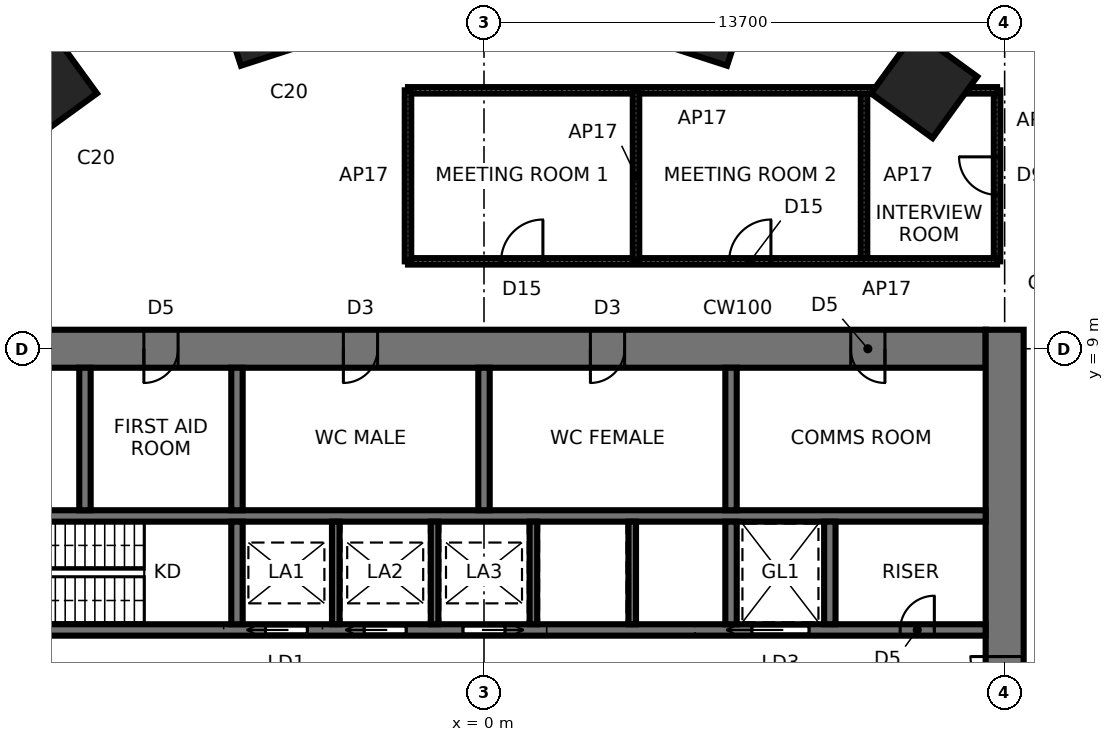
"""IFC4 building model, lengths in metres.
Left out: names, types, materials, properties, quantities, classifications, styles, units other than length and angle.
Written with IfcOpenShell. Run it as: python <this file> out.ifc"""

import sys

from ifc_helpers import new_model, si_unit, direction, frame, frame_2d, origin, origin_2d, place, context, subcontext, project, spatial, rectangle, extrude, element, fill, save


model = new_model("IFC4")
c1 = context("Model", 3, precision=1e-05, world=origin(), true_north=direction((0.0, 1.0)))
c2 = subcontext(c1, "Body", "Model", "MODEL_VIEW")
j1 = project(units=[si_unit("LENGTHUNIT", "METRE"), si_unit("PLANEANGLEUNIT", "RADIAN")], contexts=[c1])
p1 = place(None, origin())
s1 = spatial("IfcSite", under=j1, at=p1, CompositionType="ELEMENT")
p2 = place(p1, origin())
s2 = spatial("IfcBuilding", under=s1, at=p2, CompositionType="ELEMENT")
p3 = place(p2, frame((0.0, 0.0, 57.4)))
s3 = spatial("IfcBuildingStorey", under=s2, at=p3, CompositionType="ELEMENT", Elevation=57.4)
for number, where, z_axis, x_axis in (
    (1, (11.581, 15.94, 0.0), (0.0, 0.0, 1.0), (0.588, 0.809, 0.0)),
    (2, (5.754, 17.708, 0.0), (0.0, 0.0, 1.0), (0.309, 0.951, 0.0)),
    (3, (-5.754, 17.708, 0.0), (0.0, 0.0, 1.0), (-0.309, 0.951, 0.0)),
    (4, (-11.581, 15.94, 0.0), (0.0, 0.0, 1.0), (-0.588, 0.809, 0.0)),
):
    element("IfcColumn", number, at=place(p3, frame(where, z_axis=z_axis, x_axis=x_axis)), inside=s3, PredefinedType="COLUMN", context=c2, shape_type="SweptSolid", body=[
        extrude(rectangle(XDim=2.0, YDim=2.0, at=origin_2d()), origin(), (0.0, 0.0, 1.0), 4.2),
    ])
p4 = place(p3, frame((13.2, 9.0, 0.0), z_axis=(0.0, 0.0, 1.0), x_axis=(-1.0, 0.0, 0.0)))
e5 = element("IfcWall", 5, at=p4, inside=s3, PredefinedType="SHEAR", context=c2, shape_type="SweptSolid", body=[
    extrude(rectangle(XDim=26.4, YDim=1.0, at=frame_2d((13.2, 0.0))), origin(), (0.0, 0.0, 1.0), 4.2),
])
p5 = place(p4, frame((2.65, 0.0, 0.0)))
e6 = element("IfcOpeningElement", 6, at=p5, cuts=e5, PredefinedType="OPENING", context=c2, shape_type="SweptSolid", body=[
    extrude(rectangle(XDim=0.9, YDim=2.1, at=frame_2d((0.45, 1.05))), frame((0.0, 0.51, 0.0), z_axis=(0.0, -1.0, 0.0), x_axis=(1.0, 0.0, 0.0)), (0.0, 0.0, 1.0), 1.02),
])
p6 = place(p4, frame((9.5, 0.0, 0.0)))
e7 = element("IfcOpeningElement", 7, at=p6, cuts=e5, PredefinedType="OPENING", context=c2, shape_type="SweptSolid", body=[
    extrude(rectangle(XDim=0.9, YDim=2.1, at=frame_2d((0.45, 1.05))), frame((0.0, 0.51, 0.0), z_axis=(0.0, -1.0, 0.0), x_axis=(1.0, 0.0, 0.0)), (0.0, 0.0, 1.0), 1.02),
])
p7 = place(p4, frame((16.0, 0.0, 0.0)))
e8 = element("IfcOpeningElement", 8, at=p7, cuts=e5, PredefinedType="OPENING", context=c2, shape_type="SweptSolid", body=[
    extrude(rectangle(XDim=0.9, YDim=2.1, at=frame_2d((0.45, 1.05))), frame((0.0, 0.51, 0.0), z_axis=(0.0, -1.0, 0.0), x_axis=(1.0, 0.0, 0.0)), (0.0, 0.0, 1.0), 1.02),
])
p8 = place(p4, frame((21.25, 0.0, 0.0)))
e9 = element("IfcOpeningElement", 9, at=p8, cuts=e5, PredefinedType="OPENING", context=c2, shape_type="SweptSolid", body=[
    extrude(rectangle(XDim=0.9, YDim=2.1, at=frame_2d((0.45, 1.05))), frame((0.0, 0.51, 0.0), z_axis=(0.0, -1.0, 0.0), x_axis=(1.0, 0.0, 0.0)), (0.0, 0.0, 1.0), 1.02),
])
p9 = place(p4, frame((24.8, 0.0, 0.0)))
e10 = element("IfcOpeningElement", 10, at=p9, cuts=e5, PredefinedType="OPENING", context=c2, shape_type="SweptSolid", body=[
    extrude(rectangle(XDim=1.0, YDim=2.1, at=frame_2d((0.5, 1.05))), frame((0.0, 0.51, 0.0), z_axis=(0.0, -1.0, 0.0), x_axis=(1.0, 0.0, 0.0)), (0.0, 0.0, 1.0), 1.02),
])
p10 = place(p3, frame((13.7, -9.5, 0.0), z_axis=(0.0, 0.0, 1.0), x_axis=(0.0, 1.0, 0.0)))
e11 = element("IfcWall", 11, at=p10, inside=s3, PredefinedType="SHEAR", context=c2, shape_type="SweptSolid", body=[
    extrude(rectangle(XDim=19.0, YDim=1.0, at=frame_2d((9.5, 0.0))), origin(), (0.0, 0.0, 1.0), 4.2),
])
p11 = place(p10, frame((8.6, 0.0, 0.0)))
e12 = element("IfcOpeningElement", 12, at=p11, cuts=e11, PredefinedType="OPENING", context=c2, shape_type="SweptSolid", body=[
    extrude(rectangle(XDim=1.8, YDim=2.4, at=frame_2d((0.9, 1.2))), frame((0.0, 0.51, 0.0), z_axis=(0.0, -1.0, 0.0), x_axis=(1.0, 0.0, 0.0)), (0.0, 0.0, 1.0), 1.02),
])
p12 = place(p3, frame((-13.2, 1.6, 0.0), z_axis=(0.0, 0.0, 1.0), x_axis=(1.0, 0.0, 0.0)))
e13 = element("IfcWall", 13, at=p12, inside=s3, PredefinedType="SHEAR", context=c2, shape_type="SweptSolid", body=[
    extrude(rectangle(XDim=26.4, YDim=0.3, at=frame_2d((13.2, 0.0))), origin(), (0.0, 0.0, 1.0), 4.2),
])
p13 = place(p12, frame((0.25, 0.0, 0.0)))
e14 = element("IfcOpeningElement", 14, at=p13, cuts=e13, PredefinedType="OPENING", context=c2, shape_type="SweptSolid", body=[
    extrude(rectangle(XDim=1.0, YDim=2.1, at=frame_2d((0.5, 1.05))), frame((0.0, 0.16, 0.0), z_axis=(0.0, -1.0, 0.0), x_axis=(1.0, 0.0, 0.0)), (0.0, 0.0, 1.0), 0.32),
])
p14 = place(p12, frame((20.25, 0.0, 0.0)))
e15 = element("IfcOpeningElement", 15, at=p14, cuts=e13, PredefinedType="OPENING", context=c2, shape_type="SweptSolid", body=[
    extrude(rectangle(XDim=1.5, YDim=2.4, at=frame_2d((0.75, 1.2))), frame((0.0, 0.16, 0.0), z_axis=(0.0, -1.0, 0.0), x_axis=(1.0, 0.0, 0.0)), (0.0, 0.0, 1.0), 0.32),
])
p15 = place(p12, frame((7.45, 0.0, 0.0)))
e16 = element("IfcOpeningElement", 16, at=p15, cuts=e13, PredefinedType="OPENING", context=c2, shape_type="SweptSolid", body=[
    extrude(rectangle(XDim=1.1, YDim=2.3, at=frame_2d((0.55, 1.15))), frame((0.0, 0.16, 0.0), z_axis=(0.0, -1.0, 0.0), x_axis=(1.0, 0.0, 0.0)), (0.0, 0.0, 1.0), 0.32),
])
p16 = place(p12, frame((10.05, 0.0, 0.0)))
e17 = element("IfcOpeningElement", 17, at=p16, cuts=e13, PredefinedType="OPENING", context=c2, shape_type="SweptSolid", body=[
    extrude(rectangle(XDim=1.1, YDim=2.3, at=frame_2d((0.55, 1.15))), frame((0.0, 0.16, 0.0), z_axis=(0.0, -1.0, 0.0), x_axis=(1.0, 0.0, 0.0)), (0.0, 0.0, 1.0), 0.32),
])
p17 = place(p12, frame((12.65, 0.0, 0.0)))
e18 = element("IfcOpeningElement", 18, at=p17, cuts=e13, PredefinedType="OPENING", context=c2, shape_type="SweptSolid", body=[
    extrude(rectangle(XDim=1.1, YDim=2.3, at=frame_2d((0.55, 1.15))), frame((0.0, 0.16, 0.0), z_axis=(0.0, -1.0, 0.0), x_axis=(1.0, 0.0, 0.0)), (0.0, 0.0, 1.0), 0.32),
])
p18 = place(p12, frame((24.15, 0.0, 0.0)))
e19 = element("IfcOpeningElement", 19, at=p18, cuts=e13, PredefinedType="OPENING", context=c2, shape_type="SweptSolid", body=[
    extrude(rectangle(XDim=0.9, YDim=2.1, at=frame_2d((0.45, 1.05))), frame((0.0, 0.16, 0.0), z_axis=(0.0, -1.0, 0.0), x_axis=(1.0, 0.0, 0.0)), (0.0, 0.0, 1.0), 0.32),
])
p19 = place(p3, frame((-13.2, 4.6, 0.0), z_axis=(0.0, 0.0, 1.0), x_axis=(1.0, 0.0, 0.0)))
e20 = element("IfcWall", 20, at=p19, inside=s3, PredefinedType="SHEAR", context=c2, shape_type="SweptSolid", body=[
    extrude(rectangle(XDim=26.4, YDim=0.3, at=frame_2d((13.2, 0.0))), origin(), (0.0, 0.0, 1.0), 4.2),
])
p20 = place(p3, frame((-6.5, 1.75, 0.0), z_axis=(0.0, 0.0, 1.0), x_axis=(0.0, 1.0, 0.0)))
e21 = element("IfcWall", 21, at=p20, inside=s3, PredefinedType="SHEAR", context=c2, shape_type="SweptSolid", body=[
    extrude(rectangle(XDim=2.7, YDim=0.3, at=frame_2d((1.35, 0.0))), origin(), (0.0, 0.0, 1.0), 4.2),
])
p21 = place(p3, frame((-6.5, 4.75, 0.0), z_axis=(0.0, 0.0, 1.0), x_axis=(0.0, 1.0, 0.0)))
e22 = element("IfcWall", 22, at=p21, inside=s3, PredefinedType="SHEAR", context=c2, shape_type="SweptSolid", body=[
    extrude(rectangle(XDim=3.75, YDim=0.3, at=frame_2d((1.875, 0.0))), origin(), (0.0, 0.0, 1.0), 4.2),
])
p22 = place(p3, frame((6.5, 1.75, 0.0), z_axis=(0.0, 0.0, 1.0), x_axis=(0.0, 1.0, 0.0)))
e23 = element("IfcWall", 23, at=p22, inside=s3, PredefinedType="SHEAR", context=c2, shape_type="SweptSolid", body=[
    extrude(rectangle(XDim=2.7, YDim=0.3, at=frame_2d((1.35, 0.0))), origin(), (0.0, 0.0, 1.0), 4.2),
])
p23 = place(p3, frame((6.5, 4.75, 0.0), z_axis=(0.0, 0.0, 1.0), x_axis=(0.0, 1.0, 0.0)))
e24 = element("IfcWall", 24, at=p23, inside=s3, PredefinedType="SHEAR", context=c2, shape_type="SweptSolid", body=[
    extrude(rectangle(XDim=3.75, YDim=0.3, at=frame_2d((1.875, 0.0))), origin(), (0.0, 0.0, 1.0), 4.2),
])
for number, where, z_axis, x_axis in (
    (25, (-3.9, 1.75, 0.0), (0.0, 0.0, 1.0), (0.0, 1.0, 0.0)),
    (26, (-1.3, 1.75, 0.0), (0.0, 0.0, 1.0), (0.0, 1.0, 0.0)),
    (27, (1.3, 1.75, 0.0), (0.0, 0.0, 1.0), (0.0, 1.0, 0.0)),
    (28, (3.9, 1.75, 0.0), (0.0, 0.0, 1.0), (0.0, 1.0, 0.0)),
):
    element("IfcWall", number, at=place(p3, frame(where, z_axis=z_axis, x_axis=x_axis)), inside=s3, PredefinedType="SHEAR", context=c2, shape_type="SweptSolid", body=[
        extrude(rectangle(XDim=2.7, YDim=0.2, at=frame_2d((1.35, 0.0))), origin(), (0.0, 0.0, 1.0), 4.2),
    ])
for number, where, z_axis, x_axis in (
    (29, (0.0, 4.75, 0.0), (0.0, 0.0, 1.0), (0.0, 1.0, 0.0)),
    (30, (-10.5, 4.75, 0.0), (0.0, 0.0, 1.0), (0.0, 1.0, 0.0)),
):
    element("IfcWall", number, at=place(p3, frame(where, z_axis=z_axis, x_axis=x_axis)), inside=s3, PredefinedType="SHEAR", context=c2, shape_type="SweptSolid", body=[
        extrude(rectangle(XDim=3.75, YDim=0.3, at=frame_2d((1.875, 0.0))), origin(), (0.0, 0.0, 1.0), 4.2),
    ])
p24 = place(p3, frame((9.1, 1.75, 0.0), z_axis=(0.0, 0.0, 1.0), x_axis=(0.0, 1.0, 0.0)))
e31 = element("IfcWall", 31, at=p24, inside=s3, PredefinedType="SHEAR", context=c2, shape_type="SweptSolid", body=[
    extrude(rectangle(XDim=2.7, YDim=0.3, at=frame_2d((1.35, 0.0))), origin(), (0.0, 0.0, 1.0), 4.2),
])
p25 = place(p3, frame((13.5, 15.8, 0.0), z_axis=(0.0, 0.0, 1.0), x_axis=(0.0, -1.0, 0.0)))
e32 = element("IfcWall", 32, at=p25, inside=s3, PredefinedType="PARTITIONING", context=c2, shape_type="SweptSolid", body=[
    extrude(rectangle(XDim=4.5, YDim=0.17, at=frame_2d((2.25, 0.0))), origin(), (0.0, 0.0, 1.0), 4.04),
])
p26 = place(p25, frame((1.75, 0.0, 0.0)))
e33 = element("IfcOpeningElement", 33, at=p26, cuts=e32, PredefinedType="OPENING", context=c2, shape_type="SweptSolid", body=[
    extrude(rectangle(XDim=1.0, YDim=2.4, at=frame_2d((0.5, 1.2))), frame((0.0, 0.095, 0.0), z_axis=(0.0, -1.0, 0.0), x_axis=(1.0, 0.0, 0.0)), (0.0, 0.0, 1.0), 0.19),
])
p27 = place(p3, frame((10.0, 15.8, 0.0), z_axis=(0.0, 0.0, 1.0), x_axis=(0.0, -1.0, 0.0)))
e34 = element("IfcWall", 34, at=p27, inside=s3, PredefinedType="PARTITIONING", context=c2, shape_type="SweptSolid", body=[
    extrude(rectangle(XDim=4.5, YDim=0.17, at=frame_2d((2.25, 0.0))), origin(), (0.0, 0.0, 1.0), 4.04),
])
p28 = place(p3, frame((13.5, 11.3, 0.0), z_axis=(0.0, 0.0, 1.0), x_axis=(-1.0, 0.0, 0.0)))
e35 = element("IfcWall", 35, at=p28, inside=s3, PredefinedType="PARTITIONING", context=c2, shape_type="SweptSolid", body=[
    extrude(rectangle(XDim=15.5, YDim=0.17, at=frame_2d((7.75, 0.0))), origin(), (0.0, 0.0, 1.0), 4.04),
])
p29 = place(p28, frame((11.95, 0.0, 0.0)))
e36 = element("IfcOpeningElement", 36, at=p29, cuts=e35, PredefinedType="OPENING", context=c2, shape_type="SweptSolid", body=[
    extrude(rectangle(XDim=1.1, YDim=2.4, at=frame_2d((0.55, 1.2))), frame((0.0, 0.095, 0.0), z_axis=(0.0, -1.0, 0.0), x_axis=(1.0, 0.0, 0.0)), (0.0, 0.0, 1.0), 0.19),
])
p30 = place(p28, frame((5.95, 0.0, 0.0)))
e37 = element("IfcOpeningElement", 37, at=p30, cuts=e35, PredefinedType="OPENING", context=c2, shape_type="SweptSolid", body=[
    extrude(rectangle(XDim=1.1, YDim=2.4, at=frame_2d((0.55, 1.2))), frame((0.0, 0.095, 0.0), z_axis=(0.0, -1.0, 0.0), x_axis=(1.0, 0.0, 0.0)), (0.0, 0.0, 1.0), 0.19),
])
p31 = place(p3, frame((-2.0, 15.8, 0.0), z_axis=(0.0, 0.0, 1.0), x_axis=(1.0, 0.0, 0.0)))
e38 = element("IfcWall", 38, at=p31, inside=s3, PredefinedType="PARTITIONING", context=c2, shape_type="SweptSolid", body=[
    extrude(rectangle(XDim=15.5, YDim=0.17, at=frame_2d((7.75, 0.0))), origin(), (0.0, 0.0, 1.0), 4.04),
])
for number, where, z_axis, x_axis in (
    (39, (4.0, 15.8, 0.0), (0.0, 0.0, 1.0), (0.0, -1.0, 0.0)),
    (40, (-2.0, 11.3, 0.0), (0.0, 0.0, 1.0), (0.0, 1.0, 0.0)),
):
    element("IfcWall", number, at=place(p3, frame(where, z_axis=z_axis, x_axis=x_axis)), inside=s3, PredefinedType="PARTITIONING", context=c2, shape_type="SweptSolid", body=[
        extrude(rectangle(XDim=4.5, YDim=0.17, at=frame_2d((2.25, 0.0))), origin(), (0.0, 0.0, 1.0), 4.04),
    ])
p32 = place(p11, origin())
e41 = element("IfcDoor", 41, at=p32, inside=s3, OperationType="DOUBLE_DOOR_SINGLE_SWING", PredefinedType="DOOR", context=c2, shape_type="SweptSolid", body=[
    extrude(rectangle(XDim=1.72, YDim=2.36, at=frame_2d((0.9, 1.18))), frame((0.0, 0.025, 0.0), z_axis=(0.0, -1.0, 0.0), x_axis=(1.0, 0.0, 0.0)), (0.0, 0.0, 1.0), 0.05),
    extrude(rectangle(XDim=0.04, YDim=2.4, at=frame_2d((0.02, 1.2))), frame((0.0, 0.25, 0.0), z_axis=(0.0, -1.0, 0.0), x_axis=(1.0, 0.0, 0.0)), (0.0, 0.0, 1.0), 0.5),
    extrude(rectangle(XDim=0.04, YDim=2.4, at=frame_2d((1.78, 1.2))), frame((0.0, 0.25, 0.0), z_axis=(0.0, -1.0, 0.0), x_axis=(1.0, 0.0, 0.0)), (0.0, 0.0, 1.0), 0.5),
    extrude(rectangle(XDim=1.72, YDim=0.04, at=frame_2d((0.9, 2.38))), frame((0.0, 0.25, 0.0), z_axis=(0.0, -1.0, 0.0), x_axis=(1.0, 0.0, 0.0)), (0.0, 0.0, 1.0), 0.5),
])
fill(e12, e41)
p33 = place(p14, origin())
e42 = element("IfcDoor", 42, at=p33, inside=s3, OperationType="SLIDING_TO_LEFT", PredefinedType="DOOR", context=c2, shape_type="SweptSolid", body=[
    extrude(rectangle(XDim=1.5, YDim=2.4, at=frame_2d((0.75, 1.2))), frame((0.0, 0.025, 0.0), z_axis=(0.0, -1.0, 0.0), x_axis=(1.0, 0.0, 0.0)), (0.0, 0.0, 1.0), 0.05),
])
fill(e15, e42)
p34 = place(p15, origin())
e43 = element("IfcDoor", 43, at=p34, inside=s3, OperationType="SLIDING_TO_LEFT", PredefinedType="DOOR", context=c2, shape_type="SweptSolid", body=[
    extrude(rectangle(XDim=1.1, YDim=2.3, at=frame_2d((0.55, 1.15))), frame((0.0, 0.025, 0.0), z_axis=(0.0, -1.0, 0.0), x_axis=(1.0, 0.0, 0.0)), (0.0, 0.0, 1.0), 0.05),
])
fill(e16, e43)
p35 = place(p16, origin())
e44 = element("IfcDoor", 44, at=p35, inside=s3, OperationType="SLIDING_TO_LEFT", PredefinedType="DOOR", context=c2, shape_type="SweptSolid", body=[
    extrude(rectangle(XDim=1.1, YDim=2.3, at=frame_2d((0.55, 1.15))), frame((0.0, 0.025, 0.0), z_axis=(0.0, -1.0, 0.0), x_axis=(1.0, 0.0, 0.0)), (0.0, 0.0, 1.0), 0.05),
])
fill(e17, e44)
p36 = place(p17, origin())
e45 = element("IfcDoor", 45, at=p36, inside=s3, OperationType="SLIDING_TO_RIGHT", PredefinedType="DOOR", context=c2, shape_type="SweptSolid", body=[
    extrude(rectangle(XDim=1.1, YDim=2.3, at=frame_2d((0.55, 1.15))), frame((0.0, 0.025, 0.0), z_axis=(0.0, -1.0, 0.0), x_axis=(1.0, 0.0, 0.0)), (0.0, 0.0, 1.0), 0.05),
])
fill(e18, e45)
p37 = place(p18, origin())
e46 = element("IfcDoor", 46, at=p37, inside=s3, OperationType="SINGLE_SWING_RIGHT", PredefinedType="DOOR", context=c2, shape_type="SweptSolid", body=[
    extrude(rectangle(XDim=0.9, YDim=2.1, at=frame_2d((0.45, 1.05))), frame((0.0, 0.025, 0.0), z_axis=(0.0, -1.0, 0.0), x_axis=(1.0, 0.0, 0.0)), (0.0, 0.0, 1.0), 0.05),
])
fill(e19, e46)
p38 = place(p5, origin())
e47 = element("IfcDoor", 47, at=p38, inside=s3, OperationType="SINGLE_SWING_LEFT", PredefinedType="DOOR", context=c2, shape_type="SweptSolid", body=[
    extrude(rectangle(XDim=0.82, YDim=2.06, at=frame_2d((0.45, 1.03))), frame((0.0, 0.025, 0.0), z_axis=(0.0, -1.0, 0.0), x_axis=(1.0, 0.0, 0.0)), (0.0, 0.0, 1.0), 0.05),
    extrude(rectangle(XDim=0.04, YDim=2.1, at=frame_2d((0.02, 1.05))), frame((0.0, 0.25, 0.0), z_axis=(0.0, -1.0, 0.0), x_axis=(1.0, 0.0, 0.0)), (0.0, 0.0, 1.0), 0.5),
    extrude(rectangle(XDim=0.04, YDim=2.1, at=frame_2d((0.88, 1.05))), frame((0.0, 0.25, 0.0), z_axis=(0.0, -1.0, 0.0), x_axis=(1.0, 0.0, 0.0)), (0.0, 0.0, 1.0), 0.5),
    extrude(rectangle(XDim=0.82, YDim=0.04, at=frame_2d((0.45, 2.08))), frame((0.0, 0.25, 0.0), z_axis=(0.0, -1.0, 0.0), x_axis=(1.0, 0.0, 0.0)), (0.0, 0.0, 1.0), 0.5),
])
fill(e6, e47)
p39 = place(p6, origin())
e48 = element("IfcDoor", 48, at=p39, inside=s3, OperationType="SINGLE_SWING_RIGHT", PredefinedType="DOOR", context=c2, shape_type="SweptSolid", body=[
    extrude(rectangle(XDim=0.82, YDim=2.06, at=frame_2d((0.45, 1.03))), frame((0.0, 0.025, 0.0), z_axis=(0.0, -1.0, 0.0), x_axis=(1.0, 0.0, 0.0)), (0.0, 0.0, 1.0), 0.05),
    extrude(rectangle(XDim=0.04, YDim=2.1, at=frame_2d((0.02, 1.05))), frame((0.0, 0.25, 0.0), z_axis=(0.0, -1.0, 0.0), x_axis=(1.0, 0.0, 0.0)), (0.0, 0.0, 1.0), 0.5),
    extrude(rectangle(XDim=0.04, YDim=2.1, at=frame_2d((0.88, 1.05))), frame((0.0, 0.25, 0.0), z_axis=(0.0, -1.0, 0.0), x_axis=(1.0, 0.0, 0.0)), (0.0, 0.0, 1.0), 0.5),
    extrude(rectangle(XDim=0.82, YDim=0.04, at=frame_2d((0.45, 2.08))), frame((0.0, 0.25, 0.0), z_axis=(0.0, -1.0, 0.0), x_axis=(1.0, 0.0, 0.0)), (0.0, 0.0, 1.0), 0.5),
])
fill(e7, e48)
p40 = place(p7, origin())
e49 = element("IfcDoor", 49, at=p40, inside=s3, OperationType="SINGLE_SWING_RIGHT", PredefinedType="DOOR", context=c2, shape_type="SweptSolid", body=[
    extrude(rectangle(XDim=0.82, YDim=2.06, at=frame_2d((0.45, 1.03))), frame((0.0, 0.025, 0.0), z_axis=(0.0, -1.0, 0.0), x_axis=(1.0, 0.0, 0.0)), (0.0, 0.0, 1.0), 0.05),
    extrude(rectangle(XDim=0.04, YDim=2.1, at=frame_2d((0.02, 1.05))), frame((0.0, 0.25, 0.0), z_axis=(0.0, -1.0, 0.0), x_axis=(1.0, 0.0, 0.0)), (0.0, 0.0, 1.0), 0.5),
    extrude(rectangle(XDim=0.04, YDim=2.1, at=frame_2d((0.88, 1.05))), frame((0.0, 0.25, 0.0), z_axis=(0.0, -1.0, 0.0), x_axis=(1.0, 0.0, 0.0)), (0.0, 0.0, 1.0), 0.5),
    extrude(rectangle(XDim=0.82, YDim=0.04, at=frame_2d((0.45, 2.08))), frame((0.0, 0.25, 0.0), z_axis=(0.0, -1.0, 0.0), x_axis=(1.0, 0.0, 0.0)), (0.0, 0.0, 1.0), 0.5),
])
fill(e8, e49)
p41 = place(p8, origin())
e50 = element("IfcDoor", 50, at=p41, inside=s3, OperationType="SINGLE_SWING_RIGHT", PredefinedType="DOOR", context=c2, shape_type="SweptSolid", body=[
    extrude(rectangle(XDim=0.82, YDim=2.06, at=frame_2d((0.45, 1.03))), frame((0.0, 0.025, 0.0), z_axis=(0.0, -1.0, 0.0), x_axis=(1.0, 0.0, 0.0)), (0.0, 0.0, 1.0), 0.05),
    extrude(rectangle(XDim=0.04, YDim=2.1, at=frame_2d((0.02, 1.05))), frame((0.0, 0.25, 0.0), z_axis=(0.0, -1.0, 0.0), x_axis=(1.0, 0.0, 0.0)), (0.0, 0.0, 1.0), 0.5),
    extrude(rectangle(XDim=0.04, YDim=2.1, at=frame_2d((0.88, 1.05))), frame((0.0, 0.25, 0.0), z_axis=(0.0, -1.0, 0.0), x_axis=(1.0, 0.0, 0.0)), (0.0, 0.0, 1.0), 0.5),
    extrude(rectangle(XDim=0.82, YDim=0.04, at=frame_2d((0.45, 2.08))), frame((0.0, 0.25, 0.0), z_axis=(0.0, -1.0, 0.0), x_axis=(1.0, 0.0, 0.0)), (0.0, 0.0, 1.0), 0.5),
])
fill(e9, e50)
p42 = place(p29, frame((1.1, 0.0, 0.0), z_axis=(0.0, 0.0, 1.0), x_axis=(-1.0, 0.0, 0.0)))
e51 = element("IfcDoor", 51, at=p42, inside=s3, OperationType="SINGLE_SWING_RIGHT", PredefinedType="DOOR", context=c2, shape_type="SweptSolid", body=[
    extrude(rectangle(XDim=1.1, YDim=2.4, at=frame_2d((0.55, 1.2))), frame((0.0, 0.025, 0.0), z_axis=(0.0, -1.0, 0.0), x_axis=(1.0, 0.0, 0.0)), (0.0, 0.0, 1.0), 0.05),
])
fill(e36, e51)
p43 = place(p30, frame((1.1, 0.0, 0.0), z_axis=(0.0, 0.0, 1.0), x_axis=(-1.0, 0.0, 0.0)))
e52 = element("IfcDoor", 52, at=p43, inside=s3, OperationType="SINGLE_SWING_RIGHT", PredefinedType="DOOR", context=c2, shape_type="SweptSolid", body=[
    extrude(rectangle(XDim=1.1, YDim=2.4, at=frame_2d((0.55, 1.2))), frame((0.0, 0.025, 0.0), z_axis=(0.0, -1.0, 0.0), x_axis=(1.0, 0.0, 0.0)), (0.0, 0.0, 1.0), 0.05),
])
fill(e37, e52)
p44 = place(p26, frame((1.0, 0.0, 0.0), z_axis=(0.0, 0.0, 1.0), x_axis=(-1.0, 0.0, 0.0)))
e53 = element("IfcDoor", 53, at=p44, inside=s3, OperationType="SINGLE_SWING_RIGHT", PredefinedType="DOOR", context=c2, shape_type="SweptSolid", body=[
    extrude(rectangle(XDim=1.0, YDim=2.4, at=frame_2d((0.5, 1.2))), frame((0.0, 0.025, 0.0), z_axis=(0.0, -1.0, 0.0), x_axis=(1.0, 0.0, 0.0)), (0.0, 0.0, 1.0), 0.05),
])
fill(e33, e53)
save(model, sys.argv[1])
